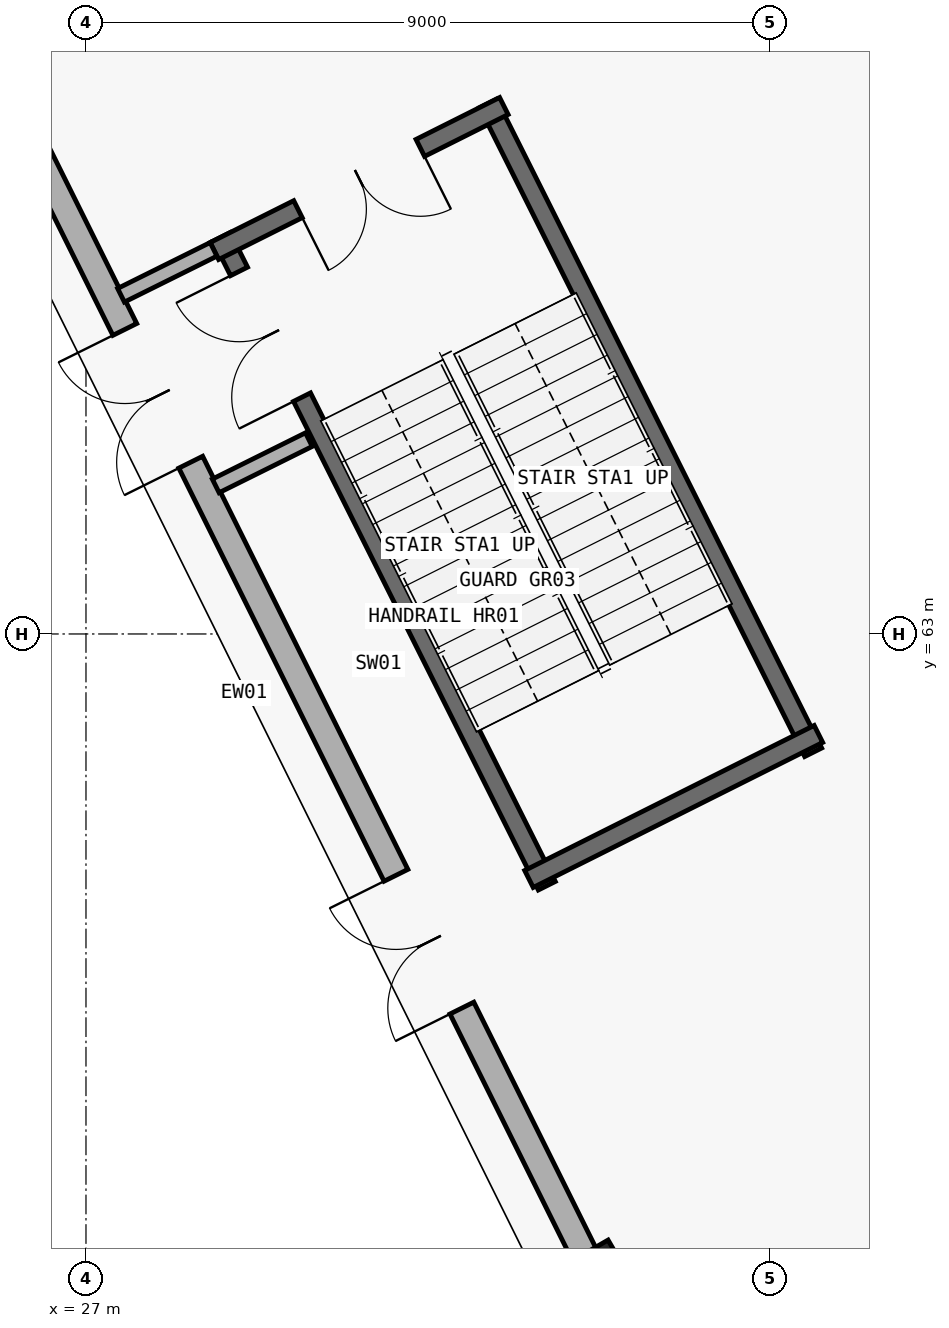
"""IFC4 building model, lengths in metres.
Left out: names, types, materials, properties, quantities, classifications, styles, units other than length and angle.
Written with IfcOpenShell. Run it as: python <this file> out.ifc"""

import sys

from ifc_helpers import new_model, si_unit, direction, frame, frame_2d, origin, origin_2d, place, context, subcontext, project, spatial, rectangle, extrude, element, fill, save


model = new_model("IFC4")
c1 = context("Model", 3, precision=1e-05, world=origin(), true_north=direction((0.0, 1.0)))
c2 = subcontext(c1, "Body", "Model", "MODEL_VIEW")
j1 = project(units=[si_unit("LENGTHUNIT", "METRE"), si_unit("PLANEANGLEUNIT", "RADIAN")], contexts=[c1])
p1 = place(None, origin())
s1 = spatial("IfcSite", under=j1, at=p1, CompositionType="ELEMENT")
p2 = place(p1, origin())
s2 = spatial("IfcBuilding", under=s1, at=p2, CompositionType="ELEMENT")
p3 = place(p2, origin())
s3 = spatial("IfcBuildingStorey", under=s2, at=p3, CompositionType="ELEMENT", Elevation=0.0)
p4 = place(p3, frame((33.798, 54.35, 0.0), z_axis=(0.0, 0.0, 1.0), x_axis=(0.866025403784, 0.5, 0.0)))
e1 = element("IfcColumn", 1, at=p4, inside=s3, PredefinedType="COLUMN", context=c2, shape_type="SweptSolid", body=[
    extrude(rectangle(XDim=0.8, YDim=1.1, at=origin_2d()), origin(), (0.0, 0.0, 1.0), 5.4),
])
p5 = place(p3, frame((33.564, 54.821, 0.0), z_axis=(0.0, 0.0, 1.0), x_axis=(-0.444884558919, 0.895587923788, 0.0)))
e2 = element("IfcWall", 2, at=p5, inside=s3, PredefinedType="STANDARD", context=c2, shape_type="SweptSolid", body=[
    extrude(rectangle(XDim=19.216, YDim=0.35, at=frame_2d((9.608, 0.0))), origin(), (0.0, 0.0, 1.0), 4.165),
])
p6 = place(p5, frame((11.656, 0.0, 0.0)))
e3 = element("IfcOpeningElement", 3, at=p6, cuts=e2, PredefinedType="OPENING", context=c2, shape_type="SweptSolid", body=[
    extrude(rectangle(XDim=1.95, YDim=2.25, at=frame_2d((0.975, 1.125))), frame((0.0, 0.185, 0.0), z_axis=(0.0, -1.0, 0.0), x_axis=(1.0, 0.0, 0.0)), (0.0, 0.0, 1.0), 0.37),
])
p7 = place(p5, frame((3.637, 0.0, 0.0)))
e4 = element("IfcOpeningElement", 4, at=p7, cuts=e2, PredefinedType="OPENING", context=c2, shape_type="SweptSolid", body=[
    extrude(rectangle(XDim=1.95, YDim=2.25, at=frame_2d((0.975, 1.125))), frame((0.0, 0.185, 0.0), z_axis=(0.0, -1.0, 0.0), x_axis=(1.0, 0.0, 0.0)), (0.0, 0.0, 1.0), 0.37),
])
p8 = place(p3, frame((33.063, 59.687, 0.0), z_axis=(0.0, 0.0, 1.0), x_axis=(-0.447919041961, 0.894074119885, 0.0)))
e5 = element("IfcWall", 5, at=p8, inside=s3, PredefinedType="SHEAR", context=c2, shape_type="SweptSolid", body=[
    extrude(rectangle(XDim=9.55, YDim=0.25, at=frame_2d((4.775, 0.0))), origin(), (0.0, 0.0, 1.0), 5.1),
])
p9 = place(p8, frame((7.19, 0.0, 0.0)))
e6 = element("IfcOpeningElement", 6, at=p9, cuts=e5, PredefinedType="OPENING", context=c2, shape_type="SweptSolid", body=[
    extrude(rectangle(XDim=1.85, YDim=2.3, at=frame_2d((0.925, 1.15))), frame((0.0, 0.135, 0.0), z_axis=(0.0, -1.0, 0.0), x_axis=(1.0, 0.0, 0.0)), (0.0, 0.0, 1.0), 0.27),
])
p10 = place(p3, frame((36.568, 61.443, 0.0), z_axis=(0.0, 0.0, 1.0), x_axis=(-0.447919041961, 0.894074119885, 0.0)))
e7 = element("IfcWall", 7, at=p10, inside=s3, PredefinedType="SHEAR", context=c2, shape_type="SweptSolid", body=[
    extrude(rectangle(XDim=9.55, YDim=0.25, at=frame_2d((4.775, 0.0))), origin(), (0.0, 0.0, 1.0), 5.1),
])
p11 = place(p3, frame((32.498, 69.946, 0.0), z_axis=(0.0, 0.0, 1.0), x_axis=(-0.89409454548, -0.447878268888, 0.0)))
e8 = element("IfcWall", 8, at=p11, inside=s3, PredefinedType="SHEAR", context=c2, shape_type="SweptSolid", body=[
    extrude(rectangle(XDim=4.26, YDim=0.25, at=frame_2d((2.13, 0.0))), origin(), (0.0, 0.0, 1.0), 5.1),
])
p12 = place(p11, frame((1.23, 0.0, 0.0)))
e9 = element("IfcOpeningElement", 9, at=p12, cuts=e8, PredefinedType="OPENING", context=c2, shape_type="SweptSolid", body=[
    extrude(rectangle(XDim=1.8, YDim=2.25, at=frame_2d((0.9, 1.125))), frame((0.0, 0.135, 0.0), z_axis=(0.0, -1.0, 0.0), x_axis=(1.0, 0.0, 0.0)), (0.0, 0.0, 1.0), 0.27),
])
p13 = place(p3, frame((32.828, 59.777, 0.0), z_axis=(0.0, 0.0, 1.0), x_axis=(0.89409454548, 0.447878268888, 0.0)))
e10 = element("IfcWall", 10, at=p13, inside=s3, PredefinedType="SHEAR", context=c2, shape_type="SweptSolid", body=[
    extrude(rectangle(XDim=4.26, YDim=0.25, at=frame_2d((2.13, 0.0))), origin(), (0.0, 0.0, 1.0), 5.1),
])
p14 = place(p3, frame((28.678, 68.06, 0.0), z_axis=(0.0, 0.0, 1.0), x_axis=(-0.895788443733, -0.444480667829, 0.0)))
e11 = element("IfcWall", 11, at=p14, inside=s3, PredefinedType="PARTITIONING", context=c2, shape_type="SweptSolid", body=[
    extrude(rectangle(XDim=1.359, YDim=0.2, at=frame_2d((0.679, 0.0))), origin(), (0.0, 0.0, 1.0), 4.165),
])
p15 = place(p3, frame((29.932, 65.557, 0.0), z_axis=(0.0, 0.0, 1.0), x_axis=(-0.895601808574, -0.44485660665, 0.0)))
e12 = element("IfcWall", 12, at=p15, inside=s3, PredefinedType="PARTITIONING", context=c2, shape_type="SweptSolid", body=[
    extrude(rectangle(XDim=1.368, YDim=0.2, at=frame_2d((0.684, 0.0))), origin(), (0.0, 0.0, 1.0), 4.165),
])
p16 = place(p6, origin())
e13 = element("IfcDoor", 13, at=p16, inside=s3, OperationType="DOUBLE_DOOR_SINGLE_SWING", PredefinedType="DOOR", context=c2, shape_type="SweptSolid", body=[
    extrude(rectangle(XDim=1.95, YDim=2.25, at=frame_2d((0.975, 1.125))), frame((0.0, 0.025, 0.0), z_axis=(0.0, -1.0, 0.0), x_axis=(1.0, 0.0, 0.0)), (0.0, 0.0, 1.0), 0.05),
])
fill(e3, e13)
p17 = place(p7, origin())
e14 = element("IfcDoor", 14, at=p17, inside=s3, OperationType="DOUBLE_DOOR_SINGLE_SWING", PredefinedType="DOOR", context=c2, shape_type="SweptSolid", body=[
    extrude(rectangle(XDim=1.95, YDim=2.25, at=frame_2d((0.975, 1.125))), frame((0.0, 0.025, 0.0), z_axis=(0.0, -1.0, 0.0), x_axis=(1.0, 0.0, 0.0)), (0.0, 0.0, 1.0), 0.05),
])
fill(e4, e14)
p18 = place(p12, origin())
e15 = element("IfcDoor", 15, at=p18, inside=s3, OperationType="DOUBLE_DOOR_SINGLE_SWING", PredefinedType="DOOR", context=c2, shape_type="SweptSolid", body=[
    extrude(rectangle(XDim=1.8, YDim=2.25, at=frame_2d((0.9, 1.125))), frame((0.0, 0.025, 0.0), z_axis=(0.0, -1.0, 0.0), x_axis=(1.0, 0.0, 0.0)), (0.0, 0.0, 1.0), 0.05),
])
fill(e9, e15)
p19 = place(p9, origin())
e16 = element("IfcDoor", 16, at=p19, inside=s3, OperationType="DOUBLE_DOOR_SINGLE_SWING", PredefinedType="DOOR", context=c2, shape_type="SweptSolid", body=[
    extrude(rectangle(XDim=1.85, YDim=2.3, at=frame_2d((0.925, 1.15))), frame((0.0, 0.025, 0.0), z_axis=(0.0, -1.0, 0.0), x_axis=(1.0, 0.0, 0.0)), (0.0, 0.0, 1.0), 0.05),
])
fill(e6, e16)
save(model, sys.argv[1])
